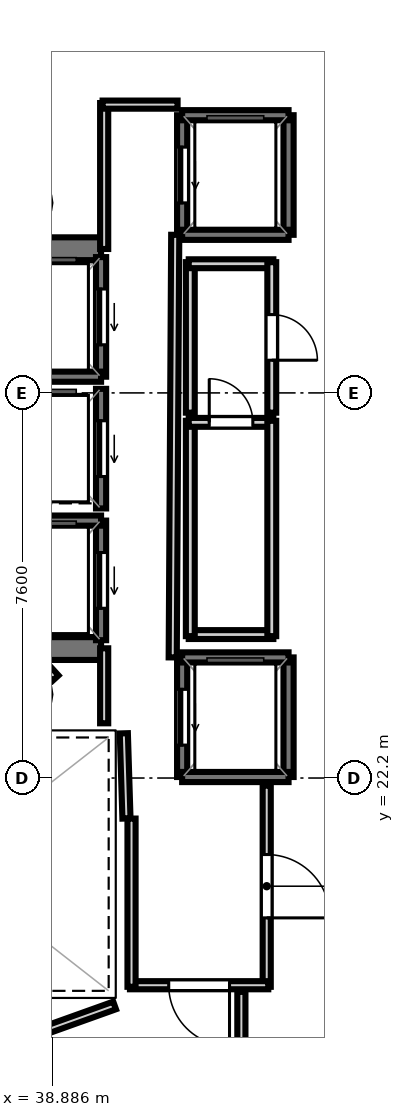
"""IFC4 building model, lengths in metres.
Left out: names, types, materials, properties, quantities, classifications, styles, units other than length and angle.
Written with IfcOpenShell. Run it as: python <this file> out.ifc"""

import sys

from ifc_helpers import new_model, si_unit, direction, frame, frame_2d, origin, place, context, subcontext, project, spatial, rectangle, extrude, element, fill, save


model = new_model("IFC4")
c1 = context("Model", 3, precision=1e-05, world=origin(), true_north=direction((0.0, 1.0)))
c2 = subcontext(c1, "Body", "Model", "MODEL_VIEW")
j1 = project(units=[si_unit("LENGTHUNIT", "METRE"), si_unit("PLANEANGLEUNIT", "RADIAN")], contexts=[c1])
p1 = place(None, origin())
s1 = spatial("IfcSite", under=j1, at=p1, CompositionType="ELEMENT")
p2 = place(p1, origin())
s2 = spatial("IfcBuilding", under=s1, at=p2, CompositionType="ELEMENT")
p3 = place(p2, frame((0.0, 0.0, 302.8)))
s3 = spatial("IfcBuildingStorey", under=s2, at=p3, CompositionType="ELEMENT", Elevation=302.8)
p4 = place(p3, frame((29.33, 32.645, 0.0), z_axis=(0.0, 0.0, 1.0), x_axis=(1.0, 0.0, 0.0)))
e1 = element("IfcWall", 1, at=p4, inside=s3, PredefinedType="SHEAR", context=c2, shape_type="SweptSolid", body=[
    extrude(rectangle(XDim=10.52, YDim=0.45, at=frame_2d((5.26, 0.0))), origin(), (0.0, 0.0, 1.0), 3.52),
])
p5 = place(p4, frame((0.895, 0.0, 0.0)))
e2 = element("IfcOpeningElement", 2, at=p5, cuts=e1, PredefinedType="OPENING", context=c2, shape_type="SweptSolid", body=[
    extrude(rectangle(XDim=1.25, YDim=2.15, at=frame_2d((0.625, 1.075))), frame((0.0, 0.235, 0.0), z_axis=(0.0, -1.0, 0.0), x_axis=(1.0, 0.0, 0.0)), (0.0, 0.0, 1.0), 0.47),
])
p6 = place(p3, frame((29.33, 24.755, 0.0), z_axis=(0.0, 0.0, 1.0), x_axis=(1.0, 0.0, 0.0)))
e3 = element("IfcWall", 3, at=p6, inside=s3, PredefinedType="SHEAR", context=c2, shape_type="SweptSolid", body=[
    extrude(rectangle(XDim=10.52, YDim=0.45, at=frame_2d((5.26, 0.0))), origin(), (0.0, 0.0, 1.0), 3.52),
])
p7 = place(p6, frame((0.695, 0.0, 0.0)))
e4 = element("IfcOpeningElement", 4, at=p7, cuts=e3, PredefinedType="OPENING", context=c2, shape_type="SweptSolid", body=[
    extrude(rectangle(XDim=1.25, YDim=2.15, at=frame_2d((0.625, 1.075))), frame((0.0, 0.235, 0.0), z_axis=(0.0, -1.0, 0.0), x_axis=(1.0, 0.0, 0.0)), (0.0, 0.0, 1.0), 0.47),
])
p8 = place(p3, frame((39.85, 30.12, 0.0), z_axis=(0.0, 0.0, 1.0), x_axis=(0.0, 1.0, 0.0)))
e5 = element("IfcWall", 5, at=p8, inside=s3, PredefinedType="SOLIDWALL", context=c2, shape_type="SweptSolid", body=[
    extrude(rectangle(XDim=2.36, YDim=0.2, at=frame_2d((1.18, 0.0))), origin(), (0.0, 0.0, 1.0), 3.52),
])
p9 = place(p8, frame((0.63, 0.0, 0.0)))
e6 = element("IfcOpeningElement", 6, at=p9, cuts=e5, PredefinedType="OPENING", context=c2, shape_type="SweptSolid", body=[
    extrude(rectangle(XDim=1.1, YDim=2.15, at=frame_2d((0.55, 1.075))), frame((0.0, 0.11, 0.0), z_axis=(0.0, -1.0, 0.0), x_axis=(1.0, 0.0, 0.0)), (0.0, 0.0, 1.0), 0.22),
])
p10 = place(p3, frame((37.75, 30.12, 0.0), z_axis=(0.0, 0.0, 1.0), x_axis=(1.0, 0.0, 0.0)))
e7 = element("IfcWall", 7, at=p10, inside=s3, PredefinedType="SOLIDWALL", context=c2, shape_type="SweptSolid", body=[
    extrude(rectangle(XDim=2.1, YDim=0.2, at=frame_2d((1.05, 0.0))), origin(), (0.0, 0.0, 1.0), 3.52),
])
p11 = place(p3, frame((39.85, 24.92, 0.0), z_axis=(0.0, 0.0, 1.0), x_axis=(0.0, 1.0, 0.0)))
e8 = element("IfcWall", 8, at=p11, inside=s3, PredefinedType="SOLIDWALL", context=c2, shape_type="SweptSolid", body=[
    extrude(rectangle(XDim=2.36, YDim=0.2, at=frame_2d((1.18, 0.0))), origin(), (0.0, 0.0, 1.0), 3.52),
])
p12 = place(p11, frame((0.63, 0.0, 0.0)))
e9 = element("IfcOpeningElement", 9, at=p12, cuts=e8, PredefinedType="OPENING", context=c2, shape_type="SweptSolid", body=[
    extrude(rectangle(XDim=1.1, YDim=2.15, at=frame_2d((0.55, 1.075))), frame((0.0, 0.11, 0.0), z_axis=(0.0, -1.0, 0.0), x_axis=(1.0, 0.0, 0.0)), (0.0, 0.0, 1.0), 0.22),
])
p13 = place(p3, frame((37.75, 27.28, 0.0), z_axis=(0.0, 0.0, 1.0), x_axis=(1.0, 0.0, 0.0)))
e10 = element("IfcWall", 10, at=p13, inside=s3, PredefinedType="SOLIDWALL", context=c2, shape_type="SweptSolid", body=[
    extrude(rectangle(XDim=2.1, YDim=0.2, at=frame_2d((1.05, 0.0))), origin(), (0.0, 0.0, 1.0), 3.52),
])
p14 = place(p3, frame((39.85, 27.52, 0.0), z_axis=(0.0, 0.0, 1.0), x_axis=(0.0, 1.0, 0.0)))
e11 = element("IfcWall", 11, at=p14, inside=s3, PredefinedType="SOLIDWALL", context=c2, shape_type="SweptSolid", body=[
    extrude(rectangle(XDim=2.36, YDim=0.2, at=frame_2d((1.18, 0.0))), origin(), (0.0, 0.0, 1.0), 3.52),
])
p15 = place(p14, frame((0.63, 0.0, 0.0)))
e12 = element("IfcOpeningElement", 12, at=p15, cuts=e11, PredefinedType="OPENING", context=c2, shape_type="SweptSolid", body=[
    extrude(rectangle(XDim=1.1, YDim=2.15, at=frame_2d((0.55, 1.075))), frame((0.0, 0.11, 0.0), z_axis=(0.0, -1.0, 0.0), x_axis=(1.0, 0.0, 0.0)), (0.0, 0.0, 1.0), 0.22),
])
p16 = place(p3, frame((43.55, 22.22, 0.0), z_axis=(0.0, 0.0, 1.0), x_axis=(0.0, 1.0, 0.0)))
e13 = element("IfcWall", 13, at=p16, inside=s3, PredefinedType="SOLIDWALL", context=c2, shape_type="SweptSolid", body=[
    extrude(rectangle(XDim=2.36, YDim=0.2, at=frame_2d((1.18, 0.0))), origin(), (0.0, 0.0, 1.0), 3.52),
])
p17 = place(p3, frame((41.45, 22.22, 0.0), z_axis=(0.0, 0.0, 1.0), x_axis=(0.0, 1.0, 0.0)))
e14 = element("IfcWall", 14, at=p17, inside=s3, PredefinedType="SOLIDWALL", context=c2, shape_type="SweptSolid", body=[
    extrude(rectangle(XDim=2.36, YDim=0.2, at=frame_2d((1.18, 0.0))), origin(), (0.0, 0.0, 1.0), 3.52),
])
p18 = place(p17, frame((0.63, 0.0, 0.0)))
e15 = element("IfcOpeningElement", 15, at=p18, cuts=e14, PredefinedType="OPENING", context=c2, shape_type="SweptSolid", body=[
    extrude(rectangle(XDim=1.1, YDim=2.15, at=frame_2d((0.55, 1.075))), frame((0.0, 0.11, 0.0), z_axis=(0.0, -1.0, 0.0), x_axis=(1.0, 0.0, 0.0)), (0.0, 0.0, 1.0), 0.22),
])
for number, where, z_axis, x_axis in (
    (16, (41.45, 24.58, 0.0), (0.0, 0.0, 1.0), (1.0, 0.0, 0.0)),
    (17, (41.45, 22.22, 0.0), (0.0, 0.0, 1.0), (1.0, 0.0, 0.0)),
):
    element("IfcWall", number, at=place(p3, frame(where, z_axis=z_axis, x_axis=x_axis)), inside=s3, PredefinedType="SOLIDWALL", context=c2, shape_type="SweptSolid", body=[
        extrude(rectangle(XDim=2.1, YDim=0.2, at=frame_2d((1.05, 0.0))), origin(), (0.0, 0.0, 1.0), 3.52),
    ])
p19 = place(p3, frame((43.55, 32.92, 0.0), z_axis=(0.0, 0.0, 1.0), x_axis=(0.0, 1.0, 0.0)))
e18 = element("IfcWall", 18, at=p19, inside=s3, PredefinedType="SOLIDWALL", context=c2, shape_type="SweptSolid", body=[
    extrude(rectangle(XDim=2.36, YDim=0.2, at=frame_2d((1.18, 0.0))), origin(), (0.0, 0.0, 1.0), 3.52),
])
p20 = place(p3, frame((41.45, 32.92, 0.0), z_axis=(0.0, 0.0, 1.0), x_axis=(0.0, 1.0, 0.0)))
e19 = element("IfcWall", 19, at=p20, inside=s3, PredefinedType="SOLIDWALL", context=c2, shape_type="SweptSolid", body=[
    extrude(rectangle(XDim=2.36, YDim=0.2, at=frame_2d((1.18, 0.0))), origin(), (0.0, 0.0, 1.0), 3.52),
])
p21 = place(p20, frame((0.63, 0.0, 0.0)))
e20 = element("IfcOpeningElement", 20, at=p21, cuts=e19, PredefinedType="OPENING", context=c2, shape_type="SweptSolid", body=[
    extrude(rectangle(XDim=1.1, YDim=2.15, at=frame_2d((0.55, 1.075))), frame((0.0, 0.11, 0.0), z_axis=(0.0, -1.0, 0.0), x_axis=(1.0, 0.0, 0.0)), (0.0, 0.0, 1.0), 0.22),
])
for number, where, z_axis, x_axis in (
    (21, (41.45, 35.28, 0.0), (0.0, 0.0, 1.0), (1.0, 0.0, 0.0)),
    (22, (41.45, 32.92, 0.0), (0.0, 0.0, 1.0), (1.0, 0.0, 0.0)),
):
    element("IfcWall", number, at=place(p3, frame(where, z_axis=z_axis, x_axis=x_axis)), inside=s3, PredefinedType="SOLIDWALL", context=c2, shape_type="SweptSolid", body=[
        extrude(rectangle(XDim=2.1, YDim=0.2, at=frame_2d((1.05, 0.0))), origin(), (0.0, 0.0, 1.0), 3.52),
    ])
p22 = place(p3, frame((40.351, 21.401, 0.0), z_axis=(0.0, 0.0, 1.0), x_axis=(-0.031058045979, 0.999517582527, 0.0)))
e23 = element("IfcWall", 23, at=p22, inside=s3, PredefinedType="PARTITIONING", context=c2, shape_type="SweptSolid", body=[
    extrude(rectangle(XDim=1.682, YDim=0.16, at=frame_2d((0.841, 0.0))), origin(), (0.0, 0.0, 1.0), 2.84),
])
p23 = place(p3, frame((39.911, 23.28, 0.0), z_axis=(0.0, 0.0, 1.0), x_axis=(0.0, 1.0, 0.0)))
e24 = element("IfcWall", 24, at=p23, inside=s3, PredefinedType="PARTITIONING", context=c2, shape_type="SweptSolid", body=[
    extrude(rectangle(XDim=1.48, YDim=0.16, at=frame_2d((0.74, 0.0))), origin(), (0.0, 0.0, 1.0), 2.84),
])
p24 = place(p3, frame((39.911, 32.64, 0.0), z_axis=(0.0, 0.0, 1.0), x_axis=(0.0, 1.0, 0.0)))
e25 = element("IfcWall", 25, at=p24, inside=s3, PredefinedType="PARTITIONING", context=c2, shape_type="SweptSolid", body=[
    extrude(rectangle(XDim=2.88, YDim=0.16, at=frame_2d((1.44, 0.0))), origin(), (0.0, 0.0, 1.0), 2.84),
])
p25 = place(p3, frame((39.88, 35.489, 0.0), z_axis=(0.0, 0.0, 1.0), x_axis=(1.0, 0.0, 0.0)))
e26 = element("IfcWall", 26, at=p25, inside=s3, PredefinedType="PARTITIONING", context=c2, shape_type="SweptSolid", body=[
    extrude(rectangle(XDim=1.48, YDim=0.16, at=frame_2d((0.74, 0.0))), origin(), (0.0, 0.0, 1.0), 2.84),
])
p26 = place(p3, frame((41.313, 32.92, 0.0), z_axis=(0.0, 0.0, 1.0), x_axis=(-0.005942518022, -0.999982343084, 0.0)))
e27 = element("IfcWall", 27, at=p26, inside=s3, PredefinedType="PARTITIONING", context=c2, shape_type="SweptSolid", body=[
    extrude(rectangle(XDim=8.34, YDim=0.16, at=frame_2d((4.17, 0.0))), origin(), (0.0, 0.0, 1.0), 2.84),
])
p27 = place(p3, frame((43.119, 22.05, 0.0), z_axis=(0.0, 0.0, 1.0), x_axis=(0.0, -1.0, 0.0)))
e28 = element("IfcWall", 28, at=p27, inside=s3, PredefinedType="PARTITIONING", context=c2, shape_type="SweptSolid", body=[
    extrude(rectangle(XDim=3.97, YDim=0.16, at=frame_2d((1.985, 0.0))), origin(), (0.0, 0.0, 1.0), 2.84),
])
p28 = place(p27, frame((1.36, 0.0, 0.0)))
e29 = element("IfcOpeningElement", 29, at=p28, cuts=e28, PredefinedType="OPENING", context=c2, shape_type="SweptSolid", body=[
    extrude(rectangle(XDim=1.25, YDim=2.2, at=frame_2d((0.625, 1.1))), frame((0.0, 0.09, 0.0), z_axis=(0.0, -1.0, 0.0), x_axis=(1.0, 0.0, 0.0)), (0.0, 0.0, 1.0), 0.18),
])
p29 = place(p3, frame((43.15, 18.111, 0.0), z_axis=(0.0, 0.0, 1.0), x_axis=(-1.0, 0.0, 0.0)))
e30 = element("IfcWall", 30, at=p29, inside=s3, PredefinedType="PARTITIONING", context=c2, shape_type="SweptSolid", body=[
    extrude(rectangle(XDim=2.73, YDim=0.16, at=frame_2d((1.365, 0.0))), origin(), (0.0, 0.0, 1.0), 2.84),
])
p30 = place(p29, frame((0.765, 0.0, 0.0)))
e31 = element("IfcOpeningElement", 31, at=p30, cuts=e30, PredefinedType="OPENING", context=c2, shape_type="SweptSolid", body=[
    extrude(rectangle(XDim=1.2, YDim=2.15, at=frame_2d((0.6, 1.075))), frame((0.0, 0.09, 0.0), z_axis=(0.0, -1.0, 0.0), x_axis=(1.0, 0.0, 0.0)), (0.0, 0.0, 1.0), 0.18),
])
p31 = place(p3, frame((40.451, 18.08, 0.0), z_axis=(0.0, 0.0, 1.0), x_axis=(0.0, 1.0, 0.0)))
e32 = element("IfcWall", 32, at=p31, inside=s3, PredefinedType="PARTITIONING", context=c2, shape_type="SweptSolid", body=[
    extrude(rectangle(XDim=3.32, YDim=0.16, at=frame_2d((1.66, 0.0))), origin(), (0.0, 0.0, 1.0), 2.84),
])
p32 = place(p3, frame((43.25, 25.031, 0.0), z_axis=(0.0, 0.0, 1.0), x_axis=(-1.0, 0.0, 0.0)))
e33 = element("IfcWall", 33, at=p32, inside=s3, PredefinedType="PLUMBINGWALL", context=c2, shape_type="SweptSolid", body=[
    extrude(rectangle(XDim=1.67, YDim=0.175, at=frame_2d((0.835, 0.0))), origin(), (0.0, 0.0, 1.0), 2.84),
])
p33 = place(p3, frame((41.611, 25.0, 0.0), z_axis=(0.0, 0.0, 1.0), x_axis=(0.0, 1.0, 0.0)))
e34 = element("IfcWall", 34, at=p33, inside=s3, PredefinedType="PLUMBINGWALL", context=c2, shape_type="SweptSolid", body=[
    extrude(rectangle(XDim=4.25, YDim=0.175, at=frame_2d((2.125, 0.0))), origin(), (0.0, 0.0, 1.0), 2.84),
])
p34 = place(p3, frame((41.58, 29.219, 0.0), z_axis=(0.0, 0.0, 1.0), x_axis=(1.0, 0.0, 0.0)))
e35 = element("IfcWall", 35, at=p34, inside=s3, PredefinedType="PLUMBINGWALL", context=c2, shape_type="SweptSolid", body=[
    extrude(rectangle(XDim=1.67, YDim=0.175, at=frame_2d((0.835, 0.0))), origin(), (0.0, 0.0, 1.0), 2.84),
])
p35 = place(p34, frame((0.405, 0.0, 0.0)))
e36 = element("IfcOpeningElement", 36, at=p35, cuts=e35, PredefinedType="OPENING", context=c2, shape_type="SweptSolid", body=[
    extrude(rectangle(XDim=0.86, YDim=2.05, at=frame_2d((0.43, 1.025))), frame((0.0, 0.097, 0.0), z_axis=(0.0, -1.0, 0.0), x_axis=(1.0, 0.0, 0.0)), (0.0, 0.0, 1.0), 0.195),
])
p36 = place(p3, frame((43.219, 29.25, 0.0), z_axis=(0.0, 0.0, 1.0), x_axis=(0.0, -1.0, 0.0)))
e37 = element("IfcWall", 37, at=p36, inside=s3, PredefinedType="PLUMBINGWALL", context=c2, shape_type="SweptSolid", body=[
    extrude(rectangle(XDim=4.25, YDim=0.175, at=frame_2d((2.125, 0.0))), origin(), (0.0, 0.0, 1.0), 2.84),
])
p37 = place(p3, frame((41.611, 29.41, 0.0), z_axis=(0.0, 0.0, 1.0), x_axis=(0.0, 1.0, 0.0)))
e38 = element("IfcWall", 38, at=p37, inside=s3, PredefinedType="PLUMBINGWALL", context=c2, shape_type="SweptSolid", body=[
    extrude(rectangle(XDim=2.97, YDim=0.175, at=frame_2d((1.485, 0.0))), origin(), (0.0, 0.0, 1.0), 2.84),
])
p38 = place(p3, frame((41.58, 32.349, 0.0), z_axis=(0.0, 0.0, 1.0), x_axis=(1.0, 0.0, 0.0)))
e39 = element("IfcWall", 39, at=p38, inside=s3, PredefinedType="PLUMBINGWALL", context=c2, shape_type="SweptSolid", body=[
    extrude(rectangle(XDim=1.67, YDim=0.175, at=frame_2d((0.835, 0.0))), origin(), (0.0, 0.0, 1.0), 2.84),
])
p39 = place(p3, frame((43.219, 32.38, 0.0), z_axis=(0.0, 0.0, 1.0), x_axis=(0.0, -1.0, 0.0)))
e40 = element("IfcWall", 40, at=p39, inside=s3, PredefinedType="PLUMBINGWALL", context=c2, shape_type="SweptSolid", body=[
    extrude(rectangle(XDim=2.97, YDim=0.175, at=frame_2d((1.485, 0.0))), origin(), (0.0, 0.0, 1.0), 2.84),
])
p40 = place(p39, frame((1.035, 0.0, 0.0)))
e41 = element("IfcOpeningElement", 41, at=p40, cuts=e40, PredefinedType="OPENING", context=c2, shape_type="SweptSolid", body=[
    extrude(rectangle(XDim=0.9, YDim=2.1, at=frame_2d((0.45, 1.05))), frame((0.0, 0.097, 0.0), z_axis=(0.0, -1.0, 0.0), x_axis=(1.0, 0.0, 0.0)), (0.0, 0.0, 1.0), 0.195),
])
p41 = place(p3, frame((38.951, 24.171, 0.0), z_axis=(0.0, 0.0, 1.0), x_axis=(-0.674186852077, 0.738560822469, 0.0)))
e42 = element("IfcWall", 42, at=p41, inside=s3, PredefinedType="PARTITIONING", context=c2, shape_type="SweptSolid", body=[
    extrude(rectangle(XDim=0.281, YDim=0.16, at=frame_2d((0.14, 0.0))), origin(), (0.0, 0.0, 1.0), 2.84),
])
p42 = place(p3, frame((36.81, 16.529, 0.0), z_axis=(0.0, 0.0, 1.0), x_axis=(0.941548344365, 0.33687789364, 0.0)))
e43 = element("IfcWall", 43, at=p42, inside=s3, PredefinedType="PARTITIONING", context=c2, shape_type="SweptSolid", body=[
    extrude(rectangle(XDim=3.513, YDim=0.16, at=frame_2d((1.756, 0.0))), origin(), (0.0, 0.0, 1.0), 2.84),
])
p43 = place(p3, frame((42.619, 17.98, 0.0), z_axis=(0.0, 0.0, 1.0), x_axis=(0.0, -1.0, 0.0)))
e44 = element("IfcWall", 44, at=p43, inside=s3, PredefinedType="PARTITIONING", context=c2, shape_type="SweptSolid", body=[
    extrude(rectangle(XDim=1.93, YDim=0.16, at=frame_2d((0.965, 0.0))), origin(), (0.0, 0.0, 1.0), 2.84),
])
p44 = place(p9, origin())
e45 = element("IfcDoor", 45, at=p44, inside=s3, OperationType="SLIDING_TO_LEFT", PredefinedType="DOOR", context=c2, shape_type="SweptSolid", body=[
    extrude(rectangle(XDim=1.1, YDim=2.15, at=frame_2d((0.55, 1.075))), frame((0.0, 0.025, 0.0), z_axis=(0.0, -1.0, 0.0), x_axis=(1.0, 0.0, 0.0)), (0.0, 0.0, 1.0), 0.05),
])
fill(e6, e45)
p45 = place(p12, origin())
e46 = element("IfcDoor", 46, at=p45, inside=s3, OperationType="SLIDING_TO_LEFT", PredefinedType="DOOR", context=c2, shape_type="SweptSolid", body=[
    extrude(rectangle(XDim=1.1, YDim=2.15, at=frame_2d((0.55, 1.075))), frame((0.0, 0.025, 0.0), z_axis=(0.0, -1.0, 0.0), x_axis=(1.0, 0.0, 0.0)), (0.0, 0.0, 1.0), 0.05),
])
fill(e9, e46)
p46 = place(p15, origin())
e47 = element("IfcDoor", 47, at=p46, inside=s3, OperationType="SLIDING_TO_LEFT", PredefinedType="DOOR", context=c2, shape_type="SweptSolid", body=[
    extrude(rectangle(XDim=1.1, YDim=2.15, at=frame_2d((0.55, 1.075))), frame((0.0, 0.025, 0.0), z_axis=(0.0, -1.0, 0.0), x_axis=(1.0, 0.0, 0.0)), (0.0, 0.0, 1.0), 0.05),
])
fill(e12, e47)
p47 = place(p18, origin())
e48 = element("IfcDoor", 48, at=p47, inside=s3, OperationType="SLIDING_TO_LEFT", PredefinedType="DOOR", context=c2, shape_type="SweptSolid", body=[
    extrude(rectangle(XDim=1.1, YDim=2.15, at=frame_2d((0.55, 1.075))), frame((0.0, 0.025, 0.0), z_axis=(0.0, -1.0, 0.0), x_axis=(1.0, 0.0, 0.0)), (0.0, 0.0, 1.0), 0.05),
])
fill(e15, e48)
p48 = place(p21, origin())
e49 = element("IfcDoor", 49, at=p48, inside=s3, OperationType="SLIDING_TO_LEFT", PredefinedType="DOOR", context=c2, shape_type="SweptSolid", body=[
    extrude(rectangle(XDim=1.1, YDim=2.15, at=frame_2d((0.55, 1.075))), frame((0.0, 0.025, 0.0), z_axis=(0.0, -1.0, 0.0), x_axis=(1.0, 0.0, 0.0)), (0.0, 0.0, 1.0), 0.05),
])
fill(e20, e49)
p49 = place(p30, origin())
e50 = element("IfcDoor", 50, at=p49, inside=s3, OperationType="SINGLE_SWING_LEFT", PredefinedType="DOOR", context=c2, shape_type="SweptSolid", body=[
    extrude(rectangle(XDim=1.2, YDim=2.15, at=frame_2d((0.6, 1.075))), frame((0.0, 0.025, 0.0), z_axis=(0.0, -1.0, 0.0), x_axis=(1.0, 0.0, 0.0)), (0.0, 0.0, 1.0), 0.05),
])
fill(e31, e50)
p50 = place(p28, origin())
e51 = element("IfcDoor", 51, at=p50, inside=s3, OperationType="SINGLE_SWING_RIGHT", PredefinedType="DOOR", context=c2, shape_type="SweptSolid", body=[
    extrude(rectangle(XDim=1.25, YDim=2.2, at=frame_2d((0.625, 1.1))), frame((0.0, 0.025, 0.0), z_axis=(0.0, -1.0, 0.0), x_axis=(1.0, 0.0, 0.0)), (0.0, 0.0, 1.0), 0.05),
])
fill(e29, e51)
p51 = place(p40, origin())
e52 = element("IfcDoor", 52, at=p51, inside=s3, OperationType="SINGLE_SWING_RIGHT", PredefinedType="DOOR", context=c2, shape_type="SweptSolid", body=[
    extrude(rectangle(XDim=0.9, YDim=2.1, at=frame_2d((0.45, 1.05))), frame((0.0, 0.025, 0.0), z_axis=(0.0, -1.0, 0.0), x_axis=(1.0, 0.0, 0.0)), (0.0, 0.0, 1.0), 0.05),
])
fill(e41, e52)
p52 = place(p35, origin())
e53 = element("IfcDoor", 53, at=p52, inside=s3, OperationType="SINGLE_SWING_LEFT", PredefinedType="DOOR", context=c2, shape_type="SweptSolid", body=[
    extrude(rectangle(XDim=0.86, YDim=2.05, at=frame_2d((0.43, 1.025))), frame((0.0, 0.025, 0.0), z_axis=(0.0, -1.0, 0.0), x_axis=(1.0, 0.0, 0.0)), (0.0, 0.0, 1.0), 0.05),
])
fill(e36, e53)
save(model, sys.argv[1])
